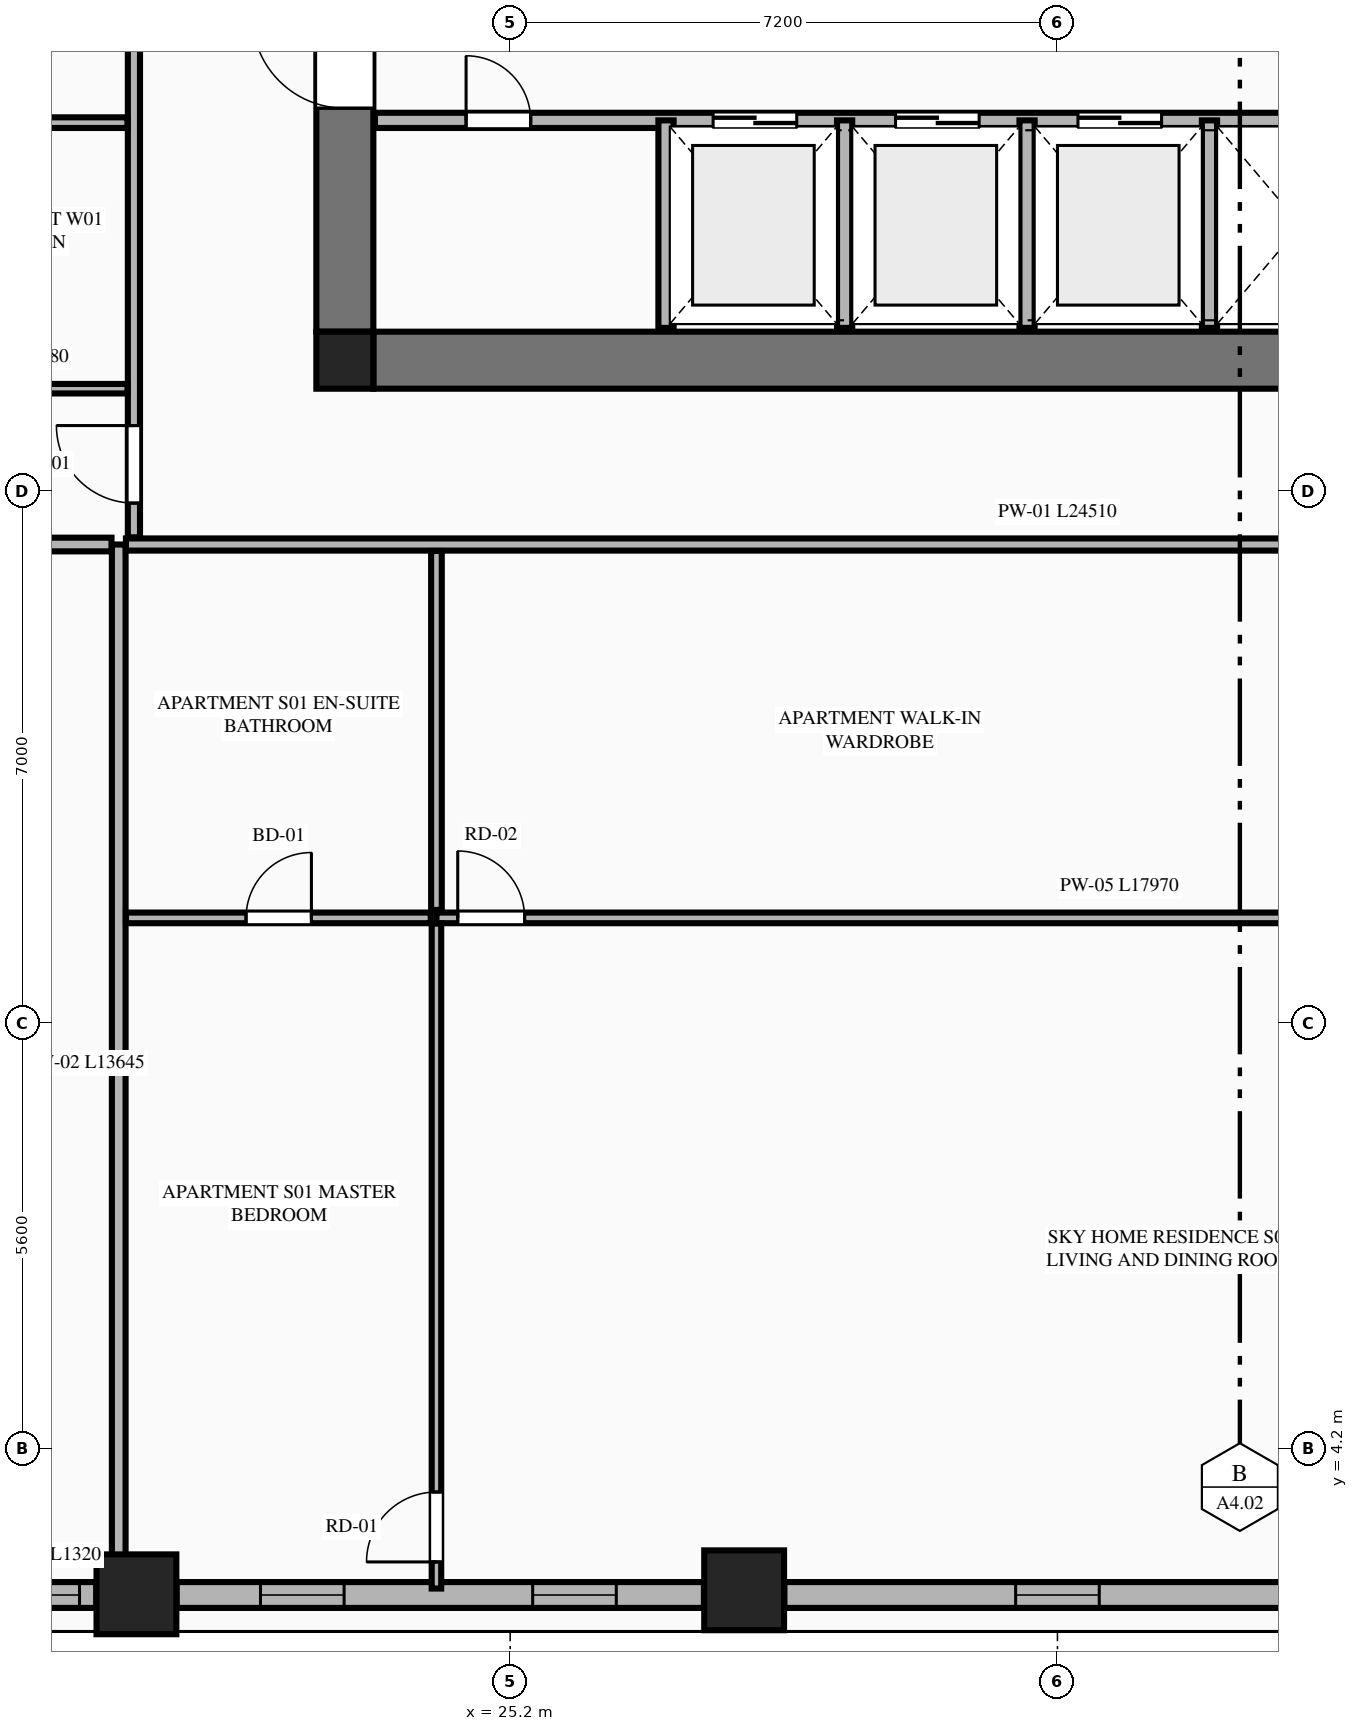
"""IFC4 building model, lengths in metres.
Left out: names, types, materials, properties, quantities, classifications, styles, units other than length and angle.
Written with IfcOpenShell. Run it as: python <this file> out.ifc"""

import sys

from ifc_helpers import new_model, si_unit, direction, frame, frame_2d, origin, origin_2d, place, context, subcontext, project, spatial, rectangle, extrude, element, fill, save


model = new_model("IFC4")
c1 = context("Model", 3, precision=1e-05, world=origin(), true_north=direction((0.0, 1.0)))
c2 = subcontext(c1, "Body", "Model", "MODEL_VIEW")
j1 = project(units=[si_unit("LENGTHUNIT", "METRE"), si_unit("PLANEANGLEUNIT", "RADIAN")], contexts=[c1])
p1 = place(None, origin())
s1 = spatial("IfcSite", under=j1, at=p1, CompositionType="ELEMENT")
p2 = place(p1, origin())
s2 = spatial("IfcBuilding", under=s1, at=p2, CompositionType="ELEMENT")
p3 = place(p2, frame((0.0, 0.0, 83.55)))
s3 = spatial("IfcBuildingStorey", under=s2, at=p3, CompositionType="ELEMENT", Elevation=83.55)
p4 = place(p3, frame((23.025, 18.525, 0.0), z_axis=(0.0, 0.0, 1.0), x_axis=(1.0, 0.0, 0.0)))
e1 = element("IfcColumn", 1, at=p4, inside=s3, PredefinedType="COLUMN", context=c2, shape_type="SweptSolid", body=[
    extrude(rectangle(XDim=0.75, YDim=0.75, at=origin_2d()), origin(), (0.0, 0.0, 1.0), 3.55),
])
p5 = place(p3, frame((23.4, 18.525, 0.0), z_axis=(0.0, 0.0, 1.0), x_axis=(1.0, 0.0, 0.0)))
e2 = element("IfcWall", 2, at=p5, inside=s3, PredefinedType="SHEAR", context=c2, shape_type="SweptSolid", body=[
    extrude(rectangle(XDim=18.0, YDim=0.75, at=frame_2d((9.0, 0.0))), origin(), (0.0, 0.0, 1.0), 3.33),
])
p6 = place(p3, frame((23.025, 18.9, 0.0), z_axis=(0.0, 0.0, 1.0), x_axis=(0.0, 1.0, 0.0)))
e3 = element("IfcWall", 3, at=p6, inside=s3, PredefinedType="SHEAR", context=c2, shape_type="SweptSolid", body=[
    extrude(rectangle(XDim=14.0, YDim=0.75, at=frame_2d((7.0, 0.0))), origin(), (0.0, 0.0, 1.0), 3.33),
])
p7 = place(p6, frame((2.94, 0.0, 0.0)))
e4 = element("IfcOpeningElement", 4, at=p7, cuts=e3, PredefinedType="OPENING", context=c2, shape_type="SweptSolid", body=[
    extrude(rectangle(XDim=1.22, YDim=2.25, at=frame_2d((0.61, 1.125))), frame((0.0, 0.385, 0.0), z_axis=(0.0, -1.0, 0.0), x_axis=(1.0, 0.0, 0.0)), (0.0, 0.0, 1.0), 0.77),
])
for number, where, z_axis, x_axis in (
    (5, (20.283, 2.289, 0.0), (0.0, 0.0, 1.0), (1.0, 0.0, 0.0)),
    (6, (28.278, 2.342, 0.0), (0.0, 0.0, 1.0), (1.0, 0.0, 0.0)),
):
    element("IfcColumn", number, at=place(p3, frame(where, z_axis=z_axis, x_axis=x_axis)), inside=s3, PredefinedType="COLUMN", context=c2, shape_type="SweptSolid", body=[
        extrude(rectangle(XDim=1.05, YDim=1.05, at=origin_2d()), origin(), (0.0, 0.0, 1.0), 3.55),
    ])
p8 = place(p3, frame((23.42, 21.68, 0.0), z_axis=(0.0, 0.0, 1.0), x_axis=(1.0, 0.0, 0.0)))
e7 = element("IfcWall", 7, at=p8, inside=s3, PredefinedType="PLUMBINGWALL", context=c2, shape_type="SweptSolid", body=[
    extrude(rectangle(XDim=17.96, YDim=0.2, at=frame_2d((8.98, 0.0))), origin(), (0.0, 0.0, 1.0), 3.33),
])
p9 = place(p8, frame((4.45, 0.0, 0.0)))
e8 = element("IfcOpeningElement", 8, at=p9, cuts=e7, PredefinedType="OPENING", context=c2, shape_type="SweptSolid", body=[
    extrude(rectangle(XDim=1.1, YDim=2.2, at=frame_2d((0.55, 1.1))), frame((0.0, 0.11, 0.0), z_axis=(0.0, -1.0, 0.0), x_axis=(1.0, 0.0, 0.0)), (0.0, 0.0, 1.0), 0.22),
])
p10 = place(p8, frame((6.85, 0.0, 0.0)))
e9 = element("IfcOpeningElement", 9, at=p10, cuts=e7, PredefinedType="OPENING", context=c2, shape_type="SweptSolid", body=[
    extrude(rectangle(XDim=1.1, YDim=2.2, at=frame_2d((0.55, 1.1))), frame((0.0, 0.11, 0.0), z_axis=(0.0, -1.0, 0.0), x_axis=(1.0, 0.0, 0.0)), (0.0, 0.0, 1.0), 0.22),
])
p11 = place(p8, frame((9.25, 0.0, 0.0)))
e10 = element("IfcOpeningElement", 10, at=p11, cuts=e7, PredefinedType="OPENING", context=c2, shape_type="SweptSolid", body=[
    extrude(rectangle(XDim=1.1, YDim=2.2, at=frame_2d((0.55, 1.1))), frame((0.0, 0.11, 0.0), z_axis=(0.0, -1.0, 0.0), x_axis=(1.0, 0.0, 0.0)), (0.0, 0.0, 1.0), 0.22),
])
p12 = place(p8, frame((1.2, 0.0, 0.0)))
e11 = element("IfcOpeningElement", 11, at=p12, cuts=e7, PredefinedType="OPENING", context=c2, shape_type="SweptSolid", body=[
    extrude(rectangle(XDim=0.85, YDim=2.05, at=frame_2d((0.425, 1.025))), frame((0.0, 0.11, 0.0), z_axis=(0.0, -1.0, 0.0), x_axis=(1.0, 0.0, 0.0)), (0.0, 0.0, 1.0), 0.22),
])
p13 = place(p8, frame((13.55, 0.0, 0.0)))
e12 = element("IfcOpeningElement", 12, at=p13, cuts=e7, PredefinedType="OPENING", context=c2, shape_type="SweptSolid", body=[
    extrude(rectangle(XDim=0.85, YDim=2.05, at=frame_2d((0.425, 1.025))), frame((0.0, 0.11, 0.0), z_axis=(0.0, -1.0, 0.0), x_axis=(1.0, 0.0, 0.0)), (0.0, 0.0, 1.0), 0.22),
])
p14 = place(p8, frame((15.85, 0.0, 0.0)))
e13 = element("IfcOpeningElement", 13, at=p14, cuts=e7, PredefinedType="OPENING", context=c2, shape_type="SweptSolid", body=[
    extrude(rectangle(XDim=0.85, YDim=2.05, at=frame_2d((0.425, 1.025))), frame((0.0, 0.11, 0.0), z_axis=(0.0, -1.0, 0.0), x_axis=(1.0, 0.0, 0.0)), (0.0, 0.0, 1.0), 0.22),
])
for number, where, z_axis, x_axis in (
    (14, (27.25, 18.95, 0.0), (0.0, 0.0, 1.0), (0.0, 1.0, 0.0)),
    (15, (29.6, 18.95, 0.0), (0.0, 0.0, 1.0), (0.0, 1.0, 0.0)),
    (16, (32.0, 18.95, 0.0), (0.0, 0.0, 1.0), (0.0, 1.0, 0.0)),
    (17, (34.4, 18.95, 0.0), (0.0, 0.0, 1.0), (0.0, 1.0, 0.0)),
):
    element("IfcWall", number, at=place(p3, frame(where, z_axis=z_axis, x_axis=x_axis)), inside=s3, PredefinedType="PLUMBINGWALL", context=c2, shape_type="SweptSolid", body=[
        extrude(rectangle(XDim=2.73, YDim=0.2, at=frame_2d((1.365, 0.0))), origin(), (0.0, 0.0, 1.0), 3.33),
    ])
p15 = place(p3, frame((18.434, 2.28, 0.0), z_axis=(0.0, 0.0, 1.0), x_axis=(1.0, 0.0, 0.0)))
e18 = element("IfcWall", 18, at=p15, inside=s3, PredefinedType="STANDARD", context=c2, shape_type="SweptSolid", body=[
    extrude(rectangle(XDim=1.32, YDim=0.34, at=frame_2d((0.66, 0.0))), origin(), (0.0, 0.0, 1.0), 3.33),
])
p16 = place(p15, frame((0.22, 0.0, 0.75)))
e19 = element("IfcOpeningElement", 19, at=p16, cuts=e18, PredefinedType="OPENING", context=c2, shape_type="SweptSolid", body=[
    extrude(rectangle(XDim=0.88, YDim=2.0, at=frame_2d((0.44, 1.0))), frame((0.0, 0.18, 0.0), z_axis=(0.0, -1.0, 0.0), x_axis=(1.0, 0.0, 0.0)), (0.0, 0.0, 1.0), 0.36),
])
p17 = place(p3, frame((20.812, 2.28, 0.0), z_axis=(0.0, 0.0, 1.0), x_axis=(1.0, 0.0, 0.0)))
e20 = element("IfcWall", 20, at=p17, inside=s3, PredefinedType="STANDARD", context=c2, shape_type="SweptSolid", body=[
    extrude(rectangle(XDim=6.937, YDim=0.34, at=frame_2d((3.469, 0.0))), origin(), (0.0, 0.0, 1.0), 2.787),
])
p18 = place(p17, frame((1.103, 0.0, 0.75)))
e21 = element("IfcOpeningElement", 21, at=p18, cuts=e20, PredefinedType="OPENING", context=c2, shape_type="SweptSolid", body=[
    extrude(rectangle(XDim=1.1, YDim=1.887, at=frame_2d((0.55, 0.943))), frame((0.0, 0.18, 0.0), z_axis=(0.0, -1.0, 0.0), x_axis=(1.0, 0.0, 0.0)), (0.0, 0.0, 1.0), 0.36),
])
p19 = place(p17, frame((4.684, 0.0, 0.75)))
e22 = element("IfcOpeningElement", 22, at=p19, cuts=e20, PredefinedType="OPENING", context=c2, shape_type="SweptSolid", body=[
    extrude(rectangle(XDim=1.1, YDim=1.887, at=frame_2d((0.55, 0.943))), frame((0.0, 0.18, 0.0), z_axis=(0.0, -1.0, 0.0), x_axis=(1.0, 0.0, 0.0)), (0.0, 0.0, 1.0), 0.36),
])
p20 = place(p3, frame((28.807, 2.28, 0.0), z_axis=(0.0, 0.0, 1.0), x_axis=(1.0, 0.0, 0.0)))
e23 = element("IfcWall", 23, at=p20, inside=s3, PredefinedType="STANDARD", context=c2, shape_type="SweptSolid", body=[
    extrude(rectangle(XDim=7.186, YDim=0.34, at=frame_2d((3.593, 0.0))), origin(), (0.0, 0.0, 1.0), 2.787),
])
p21 = place(p20, frame((3.043, 0.0, 0.75)))
e24 = element("IfcOpeningElement", 24, at=p21, cuts=e23, PredefinedType="OPENING", context=c2, shape_type="SweptSolid", body=[
    extrude(rectangle(XDim=1.1, YDim=1.887, at=frame_2d((0.55, 0.943))), frame((0.0, 0.18, 0.0), z_axis=(0.0, -1.0, 0.0), x_axis=(1.0, 0.0, 0.0)), (0.0, 0.0, 1.0), 0.36),
])
p22 = place(p3, frame((20.05, 2.455, 0.0), z_axis=(0.0, 0.0, 1.0), x_axis=(0.0, 1.0, 0.0)))
e25 = element("IfcWall", 25, at=p22, inside=s3, PredefinedType="PARTITIONING", context=c2, shape_type="SweptSolid", body=[
    extrude(rectangle(XDim=13.645, YDim=0.18, at=frame_2d((6.823, 0.0))), origin(), (0.0, 0.0, 1.0), 3.33),
])
p23 = place(p3, frame((20.145, 16.1, 0.0), z_axis=(0.0, 0.0, 1.0), x_axis=(1.0, 0.0, 0.0)))
e26 = element("IfcWall", 26, at=p23, inside=s3, PredefinedType="PARTITIONING", context=c2, shape_type="SweptSolid", body=[
    extrude(rectangle(XDim=24.51, YDim=0.16, at=frame_2d((12.255, 0.0))), origin(), (0.0, 0.0, 1.0), 3.33),
])
p24 = place(p23, frame((22.305, 0.0, 0.0)))
e27 = element("IfcOpeningElement", 27, at=p24, cuts=e26, PredefinedType="OPENING", context=c2, shape_type="SweptSolid", body=[
    extrude(rectangle(XDim=1.02, YDim=2.25, at=frame_2d((0.51, 1.125))), frame((0.0, 0.09, 0.0), z_axis=(0.0, -1.0, 0.0), x_axis=(1.0, 0.0, 0.0)), (0.0, 0.0, 1.0), 0.18),
])
p25 = place(p3, frame((24.23, 11.188, 0.0), z_axis=(0.0, 0.0, 1.0), x_axis=(1.0, 0.0, 0.0)))
e28 = element("IfcWall", 28, at=p25, inside=s3, PredefinedType="PLUMBINGWALL", context=c2, shape_type="SweptSolid", body=[
    extrude(rectangle(XDim=17.97, YDim=0.14, at=frame_2d((8.985, 0.0))), origin(), (0.0, 0.0, 1.0), 3.33),
])
p26 = place(p25, frame((0.28, 0.0, 0.0)))
e29 = element("IfcOpeningElement", 29, at=p26, cuts=e28, PredefinedType="OPENING", context=c2, shape_type="SweptSolid", body=[
    extrude(rectangle(XDim=0.88, YDim=2.15, at=frame_2d((0.44, 1.075))), frame((0.0, 0.08, 0.0), z_axis=(0.0, -1.0, 0.0), x_axis=(1.0, 0.0, 0.0)), (0.0, 0.0, 1.0), 0.16),
])
p27 = place(p25, frame((11.946, 0.0, 0.0)))
e30 = element("IfcOpeningElement", 30, at=p27, cuts=e28, PredefinedType="OPENING", context=c2, shape_type="SweptSolid", body=[
    extrude(rectangle(XDim=0.86, YDim=2.1, at=frame_2d((0.43, 1.05))), frame((0.0, 0.08, 0.0), z_axis=(0.0, -1.0, 0.0), x_axis=(1.0, 0.0, 0.0)), (0.0, 0.0, 1.0), 0.16),
])
p28 = place(p25, frame((14.77, 0.0, 0.0)))
e31 = element("IfcOpeningElement", 31, at=p28, cuts=e28, PredefinedType="OPENING", context=c2, shape_type="SweptSolid", body=[
    extrude(rectangle(XDim=0.88, YDim=2.15, at=frame_2d((0.44, 1.075))), frame((0.0, 0.08, 0.0), z_axis=(0.0, -1.0, 0.0), x_axis=(1.0, 0.0, 0.0)), (0.0, 0.0, 1.0), 0.16),
])
p29 = place(p3, frame((20.145, 11.188, 0.0), z_axis=(0.0, 0.0, 1.0), x_axis=(1.0, 0.0, 0.0)))
e32 = element("IfcWall", 32, at=p29, inside=s3, PredefinedType="PLUMBINGWALL", context=c2, shape_type="SweptSolid", body=[
    extrude(rectangle(XDim=4.01, YDim=0.14, at=frame_2d((2.005, 0.0))), origin(), (0.0, 0.0, 1.0), 3.33),
])
p30 = place(p29, frame((1.58, 0.0, 0.0)))
e33 = element("IfcOpeningElement", 33, at=p30, cuts=e32, PredefinedType="OPENING", context=c2, shape_type="SweptSolid", body=[
    extrude(rectangle(XDim=0.86, YDim=2.1, at=frame_2d((0.43, 1.05))), frame((0.0, 0.08, 0.0), z_axis=(0.0, -1.0, 0.0), x_axis=(1.0, 0.0, 0.0)), (0.0, 0.0, 1.0), 0.16),
])
p31 = place(p3, frame((24.23, 11.293, 0.0), z_axis=(0.0, 0.0, 1.0), x_axis=(0.0, 1.0, 0.0)))
e34 = element("IfcWall", 34, at=p31, inside=s3, PredefinedType="PLUMBINGWALL", context=c2, shape_type="SweptSolid", body=[
    extrude(rectangle(XDim=4.722, YDim=0.14, at=frame_2d((2.361, 0.0))), origin(), (0.0, 0.0, 1.0), 3.33),
])
p32 = place(p3, frame((24.23, 2.365, 0.0), z_axis=(0.0, 0.0, 1.0), x_axis=(0.0, 1.0, 0.0)))
e35 = element("IfcWall", 35, at=p32, inside=s3, PredefinedType="PARTITIONING", context=c2, shape_type="SweptSolid", body=[
    extrude(rectangle(XDim=8.748, YDim=0.125, at=frame_2d((4.374, 0.0))), origin(), (0.0, 0.0, 1.0), 3.33),
])
p33 = place(p32, frame((0.35, 0.0, 0.0)))
e36 = element("IfcOpeningElement", 36, at=p33, cuts=e35, PredefinedType="OPENING", context=c2, shape_type="SweptSolid", body=[
    extrude(rectangle(XDim=0.92, YDim=2.15, at=frame_2d((0.46, 1.075))), frame((0.0, 0.073, 0.0), z_axis=(0.0, -1.0, 0.0), x_axis=(1.0, 0.0, 0.0)), (0.0, 0.0, 1.0), 0.145),
])
p34 = place(p3, frame((10.488, 16.1, 0.0), z_axis=(0.0, 0.0, 1.0), x_axis=(1.0, 0.0, 0.0)))
e37 = element("IfcWall", 37, at=p34, inside=s3, PredefinedType="PARTITIONING", context=c2, shape_type="SweptSolid", body=[
    extrude(rectangle(XDim=9.467, YDim=0.18, at=frame_2d((4.733, 0.0))), origin(), (0.0, 0.0, 1.0), 3.33),
])
p35 = place(p3, frame((20.25, 16.195, 0.0), z_axis=(0.0, 0.0, 1.0), x_axis=(0.0, 1.0, 0.0)))
e38 = element("IfcWall", 38, at=p35, inside=s3, PredefinedType="PARTITIONING", context=c2, shape_type="SweptSolid", body=[
    extrude(rectangle(XDim=19.41, YDim=0.16, at=frame_2d((9.705, 0.0))), origin(), (0.0, 0.0, 1.0), 2.636),
])
p36 = place(p35, frame((0.45, 0.0, 0.0)))
e39 = element("IfcOpeningElement", 39, at=p36, cuts=e38, PredefinedType="OPENING", context=c2, shape_type="SweptSolid", body=[
    extrude(rectangle(XDim=1.02, YDim=2.25, at=frame_2d((0.51, 1.125))), frame((0.0, 0.09, 0.0), z_axis=(0.0, -1.0, 0.0), x_axis=(1.0, 0.0, 0.0)), (0.0, 0.0, 1.0), 0.18),
])
p37 = place(p3, frame((17.185, 18.15, 0.0), z_axis=(0.0, 0.0, 1.0), x_axis=(1.0, 0.0, 0.0)))
e40 = element("IfcWall", 40, at=p37, inside=s3, PredefinedType="PARTITIONING", context=c2, shape_type="SweptSolid", body=[
    extrude(rectangle(XDim=2.98, YDim=0.125, at=frame_2d((1.49, 0.0))), origin(), (0.0, 0.0, 1.0), 2.636),
])
p38 = place(p3, frame((17.185, 21.65, 0.0), z_axis=(0.0, 0.0, 1.0), x_axis=(1.0, 0.0, 0.0)))
e41 = element("IfcWall", 41, at=p38, inside=s3, PredefinedType="PLUMBINGWALL", context=c2, shape_type="SweptSolid", body=[
    extrude(rectangle(XDim=2.98, YDim=0.14, at=frame_2d((1.49, 0.0))), origin(), (0.0, 0.0, 1.0), 3.33),
])
p39 = place(p7, origin())
e42 = element("IfcDoor", 42, at=p39, inside=s3, OperationType="SINGLE_SWING_RIGHT", PredefinedType="DOOR", context=c2, shape_type="SweptSolid", body=[
    extrude(rectangle(XDim=1.22, YDim=2.25, at=frame_2d((0.61, 1.125))), frame((0.0, 0.025, 0.0), z_axis=(0.0, -1.0, 0.0), x_axis=(1.0, 0.0, 0.0)), (0.0, 0.0, 1.0), 0.05),
])
fill(e4, e42)
p40 = place(p9, origin())
e43 = element("IfcDoor", 43, at=p40, inside=s3, OperationType="DOUBLE_DOOR_SLIDING", PredefinedType="DOOR", context=c2, shape_type="SweptSolid", body=[
    extrude(rectangle(XDim=1.1, YDim=2.2, at=frame_2d((0.55, 1.1))), frame((0.0, 0.025, 0.0), z_axis=(0.0, -1.0, 0.0), x_axis=(1.0, 0.0, 0.0)), (0.0, 0.0, 1.0), 0.05),
])
fill(e8, e43)
p41 = place(p10, origin())
e44 = element("IfcDoor", 44, at=p41, inside=s3, OperationType="DOUBLE_DOOR_SLIDING", PredefinedType="DOOR", context=c2, shape_type="SweptSolid", body=[
    extrude(rectangle(XDim=1.1, YDim=2.2, at=frame_2d((0.55, 1.1))), frame((0.0, 0.025, 0.0), z_axis=(0.0, -1.0, 0.0), x_axis=(1.0, 0.0, 0.0)), (0.0, 0.0, 1.0), 0.05),
])
fill(e9, e44)
p42 = place(p11, origin())
e45 = element("IfcDoor", 45, at=p42, inside=s3, OperationType="DOUBLE_DOOR_SLIDING", PredefinedType="DOOR", context=c2, shape_type="SweptSolid", body=[
    extrude(rectangle(XDim=1.1, YDim=2.2, at=frame_2d((0.55, 1.1))), frame((0.0, 0.025, 0.0), z_axis=(0.0, -1.0, 0.0), x_axis=(1.0, 0.0, 0.0)), (0.0, 0.0, 1.0), 0.05),
])
fill(e10, e45)
p43 = place(p12, origin())
e46 = element("IfcDoor", 46, at=p43, inside=s3, OperationType="SINGLE_SWING_LEFT", PredefinedType="DOOR", context=c2, shape_type="SweptSolid", body=[
    extrude(rectangle(XDim=0.85, YDim=2.05, at=frame_2d((0.425, 1.025))), frame((0.0, 0.025, 0.0), z_axis=(0.0, -1.0, 0.0), x_axis=(1.0, 0.0, 0.0)), (0.0, 0.0, 1.0), 0.05),
])
fill(e11, e46)
p44 = place(p18, origin())
e47 = element("IfcWindow", 47, at=p44, inside=s3, PartitioningType="SINGLE_PANEL", PredefinedType="WINDOW", context=c2, shape_type="SweptSolid", body=[
    extrude(rectangle(XDim=1.1, YDim=1.887, at=frame_2d((0.55, 0.943))), frame((0.0, 0.03, 0.0), z_axis=(0.0, -1.0, 0.0), x_axis=(1.0, 0.0, 0.0)), (0.0, 0.0, 1.0), 0.06),
])
fill(e21, e47)
p45 = place(p21, origin())
e48 = element("IfcWindow", 48, at=p45, inside=s3, PartitioningType="SINGLE_PANEL", PredefinedType="WINDOW", context=c2, shape_type="SweptSolid", body=[
    extrude(rectangle(XDim=1.1, YDim=1.887, at=frame_2d((0.55, 0.943))), frame((0.0, 0.03, 0.0), z_axis=(0.0, -1.0, 0.0), x_axis=(1.0, 0.0, 0.0)), (0.0, 0.0, 1.0), 0.06),
])
fill(e24, e48)
p46 = place(p26, origin())
e49 = element("IfcDoor", 49, at=p46, inside=s3, OperationType="SINGLE_SWING_LEFT", PredefinedType="DOOR", context=c2, shape_type="SweptSolid", body=[
    extrude(rectangle(XDim=0.88, YDim=2.15, at=frame_2d((0.44, 1.075))), frame((0.0, 0.025, 0.0), z_axis=(0.0, -1.0, 0.0), x_axis=(1.0, 0.0, 0.0)), (0.0, 0.0, 1.0), 0.05),
])
fill(e29, e49)
p47 = place(p30, origin())
e50 = element("IfcDoor", 50, at=p47, inside=s3, OperationType="SINGLE_SWING_RIGHT", PredefinedType="DOOR", context=c2, shape_type="SweptSolid", body=[
    extrude(rectangle(XDim=0.86, YDim=2.1, at=frame_2d((0.43, 1.05))), frame((0.0, 0.025, 0.0), z_axis=(0.0, -1.0, 0.0), x_axis=(1.0, 0.0, 0.0)), (0.0, 0.0, 1.0), 0.05),
])
fill(e33, e50)
p48 = place(p33, origin())
e51 = element("IfcDoor", 51, at=p48, inside=s3, OperationType="SINGLE_SWING_LEFT", PredefinedType="DOOR", context=c2, shape_type="SweptSolid", body=[
    extrude(rectangle(XDim=0.92, YDim=2.15, at=frame_2d((0.46, 1.075))), frame((0.0, 0.025, 0.0), z_axis=(0.0, -1.0, 0.0), x_axis=(1.0, 0.0, 0.0)), (0.0, 0.0, 1.0), 0.05),
])
fill(e36, e51)
p49 = place(p36, origin())
e52 = element("IfcDoor", 52, at=p49, inside=s3, OperationType="SINGLE_SWING_RIGHT", PredefinedType="DOOR", context=c2, shape_type="SweptSolid", body=[
    extrude(rectangle(XDim=1.02, YDim=2.25, at=frame_2d((0.51, 1.125))), frame((0.0, 0.025, 0.0), z_axis=(0.0, -1.0, 0.0), x_axis=(1.0, 0.0, 0.0)), (0.0, 0.0, 1.0), 0.05),
])
fill(e39, e52)
p50 = place(p16, origin())
e53 = element("IfcWindow", 53, at=p50, inside=s3, PartitioningType="SINGLE_PANEL", PredefinedType="WINDOW", context=c2, shape_type="SweptSolid", body=[
    extrude(rectangle(XDim=0.88, YDim=2.0, at=frame_2d((0.44, 1.0))), frame((0.0, 0.03, 0.0), z_axis=(0.0, -1.0, 0.0), x_axis=(1.0, 0.0, 0.0)), (0.0, 0.0, 1.0), 0.06),
])
fill(e19, e53)
p51 = place(p19, origin())
e54 = element("IfcWindow", 54, at=p51, inside=s3, PartitioningType="SINGLE_PANEL", PredefinedType="WINDOW", context=c2, shape_type="SweptSolid", body=[
    extrude(rectangle(XDim=1.1, YDim=1.887, at=frame_2d((0.55, 0.943))), frame((0.0, 0.03, 0.0), z_axis=(0.0, -1.0, 0.0), x_axis=(1.0, 0.0, 0.0)), (0.0, 0.0, 1.0), 0.06),
])
fill(e22, e54)
save(model, sys.argv[1])
